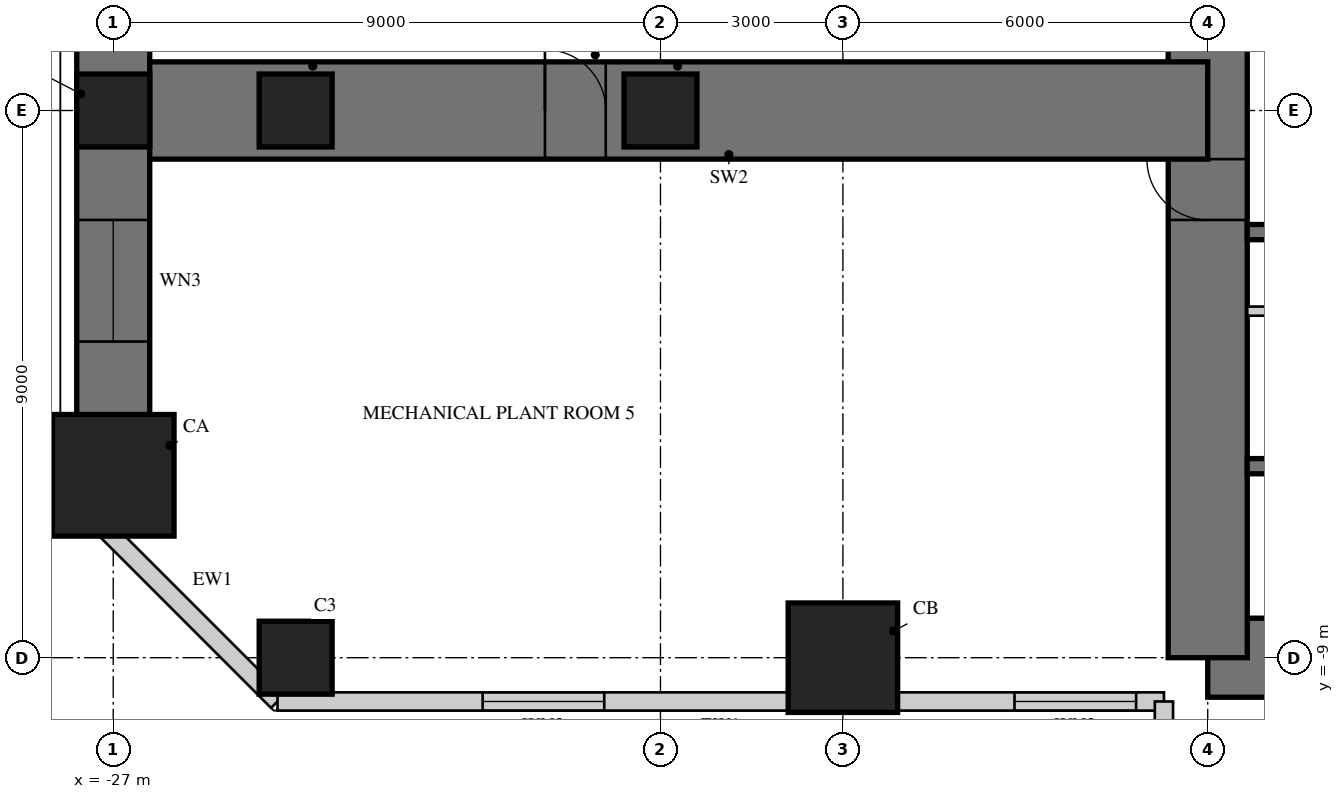
"""IFC4 building model, lengths in metres.
Left out: names, types, materials, properties, quantities, classifications, styles, units other than length and angle.
Written with IfcOpenShell. Run it as: python <this file> out.ifc"""

import sys

from ifc_helpers import new_model, si_unit, direction, frame, frame_2d, origin, origin_2d, place, context, subcontext, project, spatial, rectangle, hollow_rectangle, extrude, element, fill, save


model = new_model("IFC4")
c1 = context("Model", 3, precision=1e-05, world=origin(), true_north=direction((0.0, 1.0)))
c2 = subcontext(c1, "Body", "Model", "MODEL_VIEW")
j1 = project(units=[si_unit("LENGTHUNIT", "METRE"), si_unit("PLANEANGLEUNIT", "RADIAN")], contexts=[c1])
p1 = place(None, origin())
s1 = spatial("IfcSite", under=j1, at=p1, CompositionType="ELEMENT")
p2 = place(p1, origin())
s2 = spatial("IfcBuilding", under=s1, at=p2, CompositionType="ELEMENT")
p3 = place(p2, frame((0.0, 0.0, 18.5)))
s3 = spatial("IfcBuildingStorey", under=s2, at=p3, CompositionType="ELEMENT", Elevation=18.5)
p4 = place(p3, frame((-9.0, -9.0, 0.0), z_axis=(0.0, 0.0, 1.0), x_axis=(1.0, 0.0, 0.0)))
e1 = element("IfcWall", 1, at=p4, inside=s3, PredefinedType="SHEAR", context=c2, shape_type="SweptSolid", body=[
    extrude(rectangle(XDim=18.0, YDim=1.3, at=frame_2d((9.0, 0.0))), origin(), (0.0, 0.0, 1.0), 5.0),
])
p5 = place(p4, frame((9.8, 0.0, 0.0)))
e2 = element("IfcOpeningElement", 2, at=p5, cuts=e1, PredefinedType="OPENING", context=c2, shape_type="SweptSolid", body=[
    extrude(rectangle(XDim=1.0, YDim=2.4, at=frame_2d((0.5, 1.2))), frame((0.0, 0.66, 0.0), z_axis=(0.0, -1.0, 0.0), x_axis=(1.0, 0.0, 0.0)), (0.0, 0.0, 1.0), 1.32),
])
p6 = place(p3, frame((-9.0, 9.0, 0.0), z_axis=(0.0, 0.0, 1.0), x_axis=(0.0, -1.0, 0.0)))
e3 = element("IfcWall", 3, at=p6, inside=s3, PredefinedType="SHEAR", context=c2, shape_type="SweptSolid", body=[
    extrude(rectangle(XDim=18.0, YDim=1.3, at=frame_2d((9.0, 0.0))), origin(), (0.0, 0.0, 1.0), 5.0),
])
p7 = place(p6, frame((9.8, 0.0, 0.0)))
e4 = element("IfcOpeningElement", 4, at=p7, cuts=e3, PredefinedType="OPENING", context=c2, shape_type="SweptSolid", body=[
    extrude(rectangle(XDim=1.0, YDim=2.4, at=frame_2d((0.5, 1.2))), frame((0.0, 0.66, 0.0), z_axis=(0.0, -1.0, 0.0), x_axis=(1.0, 0.0, 0.0)), (0.0, 0.0, 1.0), 1.32),
])
for number, where, z_axis, x_axis in (
    (5, (-1.925, -2.0, 0.0), (0.0, 0.0, 1.0), (-1.0, 0.0, 0.0)),
    (6, (-1.925, -5.85, 0.0), (0.0, 0.0, 1.0), (-1.0, 0.0, 0.0)),
):
    element("IfcWall", number, at=place(p3, frame(where, z_axis=z_axis, x_axis=x_axis)), inside=s3, PredefinedType="SHEAR", context=c2, shape_type="SweptSolid", body=[
        extrude(rectangle(XDim=6.425, YDim=0.25, at=frame_2d((3.212, 0.0))), origin(), (0.0, 0.0, 1.0), 5.0),
    ])
p8 = place(p3, frame((-1.925, -3.3, 0.0), z_axis=(0.0, 0.0, 1.0), x_axis=(-1.0, 0.0, 0.0)))
e7 = element("IfcWall", 7, at=p8, inside=s3, PredefinedType="PARTITIONING", context=c2, shape_type="SweptSolid", body=[
    extrude(rectangle(XDim=6.425, YDim=0.15, at=frame_2d((3.212, 0.0))), origin(), (0.0, 0.0, 1.0), 5.0),
])
p9 = place(p8, frame((0.075, 0.0, 0.0)))
e8 = element("IfcOpeningElement", 8, at=p9, cuts=e7, PredefinedType="OPENING", context=c2, shape_type="SweptSolid", body=[
    extrude(rectangle(XDim=0.8, YDim=2.1, at=frame_2d((0.4, 1.05))), frame((0.0, 0.085, 0.0), z_axis=(0.0, -1.0, 0.0), x_axis=(1.0, 0.0, 0.0)), (0.0, 0.0, 1.0), 0.17),
])
p10 = place(p8, frame((3.675, 0.0, 0.0)))
e9 = element("IfcOpeningElement", 9, at=p10, cuts=e7, PredefinedType="OPENING", context=c2, shape_type="SweptSolid", body=[
    extrude(rectangle(XDim=0.8, YDim=2.1, at=frame_2d((0.4, 1.05))), frame((0.0, 0.085, 0.0), z_axis=(0.0, -1.0, 0.0), x_axis=(1.0, 0.0, 0.0)), (0.0, 0.0, 1.0), 0.17),
])
p11 = place(p3, frame((-9.0, 0.0, 0.0), z_axis=(0.0, 0.0, 1.0), x_axis=(-1.0, 0.0, 0.0)))
e10 = element("IfcWall", 10, at=p11, inside=s3, PredefinedType="SHEAR", context=c2, shape_type="SweptSolid", body=[
    extrude(rectangle(XDim=18.0, YDim=1.6, at=frame_2d((9.0, 0.0))), origin(), (0.0, 0.0, 1.0), 5.0),
])
p12 = place(p11, frame((9.9, 0.0, 0.0)))
e11 = element("IfcOpeningElement", 11, at=p12, cuts=e10, PredefinedType="OPENING", context=c2, shape_type="SweptSolid", body=[
    extrude(rectangle(XDim=1.0, YDim=2.2, at=frame_2d((0.5, 1.1))), frame((0.0, 0.81, 0.0), z_axis=(0.0, -1.0, 0.0), x_axis=(1.0, 0.0, 0.0)), (0.0, 0.0, 1.0), 1.62),
])
p13 = place(p3, frame((-27.0, 6.0, 0.0), z_axis=(0.0, 0.0, 1.0), x_axis=(0.0, -1.0, 0.0)))
e12 = element("IfcWall", 12, at=p13, inside=s3, PredefinedType="SHEAR", context=c2, shape_type="SweptSolid", body=[
    extrude(rectangle(XDim=12.0, YDim=1.2, at=frame_2d((6.0, 0.0))), origin(), (0.0, 0.0, 1.0), 5.0),
])
p14 = place(p13, frame((2.2, 0.0, 0.8)))
e13 = element("IfcOpeningElement", 13, at=p14, cuts=e12, PredefinedType="OPENING", context=c2, shape_type="SweptSolid", body=[
    extrude(rectangle(XDim=2.0, YDim=2.5, at=frame_2d((1.0, 1.25))), frame((0.0, 0.61, 0.0), z_axis=(0.0, -1.0, 0.0), x_axis=(1.0, 0.0, 0.0)), (0.0, 0.0, 1.0), 1.22),
])
p15 = place(p13, frame((7.8, 0.0, 0.8)))
e14 = element("IfcOpeningElement", 14, at=p15, cuts=e12, PredefinedType="OPENING", context=c2, shape_type="SweptSolid", body=[
    extrude(rectangle(XDim=2.0, YDim=2.5, at=frame_2d((1.0, 1.25))), frame((0.0, 0.61, 0.0), z_axis=(0.0, -1.0, 0.0), x_axis=(1.0, 0.0, 0.0)), (0.0, 0.0, 1.0), 1.22),
])
p16 = place(p3, frame((-15.0, -9.0, 0.0), z_axis=(0.0, 0.0, 1.0), x_axis=(1.0, 0.0, 0.0)))
e15 = element("IfcColumn", 15, at=p16, inside=s3, PredefinedType="COLUMN", context=c2, shape_type="SweptSolid", body=[
    extrude(rectangle(XDim=1.8, YDim=1.8, at=origin_2d()), origin(), (0.0, 0.0, 1.0), 5.0),
])
for number, where, z_axis, x_axis in (
    (16, (-24.0, -9.0, 0.0), (0.0, 0.0, 1.0), (1.0, 0.0, 0.0)),
    (17, (-27.0, 0.0, 0.0), (0.0, 0.0, 1.0), (1.0, 0.0, 0.0)),
):
    element("IfcColumn", number, at=place(p3, frame(where, z_axis=z_axis, x_axis=x_axis)), inside=s3, PredefinedType="COLUMN", context=c2, shape_type="SweptSolid", body=[
        extrude(rectangle(XDim=1.2, YDim=1.2, at=origin_2d()), origin(), (0.0, 0.0, 1.0), 5.0),
    ])
p17 = place(p3, frame((-27.0, -6.0, 0.0), z_axis=(0.0, 0.0, 1.0), x_axis=(1.0, 0.0, 0.0)))
e18 = element("IfcColumn", 18, at=p17, inside=s3, PredefinedType="COLUMN", context=c2, shape_type="SweptSolid", body=[
    extrude(rectangle(XDim=2.0, YDim=2.0, at=origin_2d()), origin(), (0.0, 0.0, 1.0), 5.0),
])
for number, where, z_axis, x_axis in (
    (19, (-18.0, 0.0, 0.0), (0.0, 0.0, 1.0), (1.0, 0.0, 0.0)),
    (20, (-24.0, 0.0, 0.0), (0.0, 0.0, 1.0), (1.0, 0.0, 0.0)),
):
    element("IfcColumn", number, at=place(p3, frame(where, z_axis=z_axis, x_axis=x_axis)), inside=s3, PredefinedType="COLUMN", context=c2, shape_type="SweptSolid", body=[
        extrude(rectangle(XDim=1.2, YDim=1.2, at=origin_2d()), origin(), (0.0, 0.0, 1.0), 5.0),
    ])
p18 = place(p3, frame((-27.6, -6.418, 0.0), z_axis=(0.0, 0.0, 1.0), x_axis=(0.707106781187, -0.707106781187, 0.0)))
e21 = element("IfcWall", 21, at=p18, inside=s3, PredefinedType="SOLIDWALL", context=c2, shape_type="SweptSolid", body=[
    extrude(rectangle(XDim=4.669, YDim=0.3, at=frame_2d((2.335, 0.0))), origin(), (0.0, 0.0, 1.0), 4.8),
])
p19 = place(p3, frame((-24.298, -9.72, 0.0), z_axis=(0.0, 0.0, 1.0), x_axis=(1.0, 0.0, 0.0)))
e22 = element("IfcWall", 22, at=p19, inside=s3, PredefinedType="SOLIDWALL", context=c2, shape_type="SweptSolid", body=[
    extrude(rectangle(XDim=14.578, YDim=0.3, at=frame_2d((7.289, 0.0))), origin(), (0.0, 0.0, 1.0), 4.8),
])
p20 = place(p19, frame((3.374, 0.0, 0.8)))
e23 = element("IfcOpeningElement", 23, at=p20, cuts=e22, PredefinedType="OPENING", context=c2, shape_type="SweptSolid", body=[
    extrude(rectangle(XDim=2.0, YDim=2.5, at=frame_2d((1.0, 1.25))), frame((0.0, 0.16, 0.0), z_axis=(0.0, -1.0, 0.0), x_axis=(1.0, 0.0, 0.0)), (0.0, 0.0, 1.0), 0.32),
])
p21 = place(p19, frame((12.12, 0.0, 0.8)))
e24 = element("IfcOpeningElement", 24, at=p21, cuts=e22, PredefinedType="OPENING", context=c2, shape_type="SweptSolid", body=[
    extrude(rectangle(XDim=2.0, YDim=2.5, at=frame_2d((1.0, 1.25))), frame((0.0, 0.16, 0.0), z_axis=(0.0, -1.0, 0.0), x_axis=(1.0, 0.0, 0.0)), (0.0, 0.0, 1.0), 0.32),
])
p22 = place(p3, frame((-9.72, -9.72, 0.0), z_axis=(0.0, 0.0, 1.0), x_axis=(0.0, -1.0, 0.0)))
e25 = element("IfcWall", 25, at=p22, inside=s3, PredefinedType="SOLIDWALL", context=c2, shape_type="SweptSolid", body=[
    extrude(rectangle(XDim=14.578, YDim=0.3, at=frame_2d((7.289, 0.0))), origin(), (0.0, 0.0, 1.0), 4.8),
])
p23 = place(p22, frame((0.458, 0.0, 0.8)))
e26 = element("IfcOpeningElement", 26, at=p23, cuts=e25, PredefinedType="OPENING", context=c2, shape_type="SweptSolid", body=[
    extrude(rectangle(XDim=2.0, YDim=2.5, at=frame_2d((1.0, 1.25))), frame((0.0, 0.16, 0.0), z_axis=(0.0, -1.0, 0.0), x_axis=(1.0, 0.0, 0.0)), (0.0, 0.0, 1.0), 0.32),
])
p24 = place(p22, frame((9.205, 0.0, 0.8)))
e27 = element("IfcOpeningElement", 27, at=p24, cuts=e25, PredefinedType="OPENING", context=c2, shape_type="SweptSolid", body=[
    extrude(rectangle(XDim=2.0, YDim=2.5, at=frame_2d((1.0, 1.25))), frame((0.0, 0.16, 0.0), z_axis=(0.0, -1.0, 0.0), x_axis=(1.0, 0.0, 0.0)), (0.0, 0.0, 1.0), 0.32),
])
p25 = place(p15, origin())
e28 = element("IfcWindow", 28, at=p25, inside=s3, PartitioningType="SINGLE_PANEL", PredefinedType="WINDOW", context=c2, shape_type="SweptSolid", body=[
    extrude(hollow_rectangle(XDim=2.0, YDim=2.5, WallThickness=0.06, at=frame_2d((1.0, 1.25))), frame((0.0, 0.03, 0.0), z_axis=(0.0, -1.0, 0.0), x_axis=(1.0, 0.0, 0.0)), (0.0, 0.0, 1.0), 0.06),
    extrude(rectangle(XDim=1.879, YDim=2.379, at=frame_2d((1.0, 1.25))), frame((0.0, 0.03, 0.0), z_axis=(0.0, -1.0, 0.0), x_axis=(1.0, 0.0, 0.0)), (0.0, 0.0, 1.0), 0.06),
])
fill(e14, e28)
p26 = place(p20, origin())
e29 = element("IfcWindow", 29, at=p26, inside=s3, PartitioningType="SINGLE_PANEL", PredefinedType="WINDOW", context=c2, shape_type="SweptSolid", body=[
    extrude(hollow_rectangle(XDim=2.0, YDim=2.5, WallThickness=0.06, at=frame_2d((1.0, 1.25))), frame((0.0, 0.03, 0.0), z_axis=(0.0, -1.0, 0.0), x_axis=(1.0, 0.0, 0.0)), (0.0, 0.0, 1.0), 0.06),
    extrude(rectangle(XDim=1.879, YDim=2.379, at=frame_2d((1.0, 1.25))), frame((0.0, 0.03, 0.0), z_axis=(0.0, -1.0, 0.0), x_axis=(1.0, 0.0, 0.0)), (0.0, 0.0, 1.0), 0.06),
])
fill(e23, e29)
p27 = place(p21, origin())
e30 = element("IfcWindow", 30, at=p27, inside=s3, PartitioningType="SINGLE_PANEL", PredefinedType="WINDOW", context=c2, shape_type="SweptSolid", body=[
    extrude(hollow_rectangle(XDim=2.0, YDim=2.5, WallThickness=0.06, at=frame_2d((1.0, 1.25))), frame((0.0, 0.03, 0.0), z_axis=(0.0, -1.0, 0.0), x_axis=(1.0, 0.0, 0.0)), (0.0, 0.0, 1.0), 0.06),
    extrude(rectangle(XDim=1.879, YDim=2.379, at=frame_2d((1.0, 1.25))), frame((0.0, 0.03, 0.0), z_axis=(0.0, -1.0, 0.0), x_axis=(1.0, 0.0, 0.0)), (0.0, 0.0, 1.0), 0.06),
])
fill(e24, e30)
p28 = place(p12, frame((1.0, 0.0, 0.0), z_axis=(0.0, 0.0, 1.0), x_axis=(-1.0, 0.0, 0.0)))
e31 = element("IfcDoor", 31, at=p28, inside=s3, OperationType="SINGLE_SWING_LEFT", PredefinedType="DOOR", context=c2, shape_type="SweptSolid", body=[
    extrude(rectangle(XDim=1.0, YDim=2.2, at=frame_2d((0.5, 1.1))), frame((0.0, 0.025, 0.0), z_axis=(0.0, -1.0, 0.0), x_axis=(1.0, 0.0, 0.0)), (0.0, 0.0, 1.0), 0.05),
])
fill(e11, e31)
p29 = place(p7, frame((1.0, 0.0, 0.0), z_axis=(0.0, 0.0, 1.0), x_axis=(-1.0, 0.0, 0.0)))
e32 = element("IfcDoor", 32, at=p29, inside=s3, OperationType="SINGLE_SWING_RIGHT", PredefinedType="DOOR", context=c2, shape_type="SweptSolid", body=[
    extrude(rectangle(XDim=1.0, YDim=2.4, at=frame_2d((0.5, 1.2))), frame((0.0, -0.005, 0.0), z_axis=(0.0, -1.0, 0.0), x_axis=(1.0, 0.0, 0.0)), (0.0, 0.0, 1.0), 0.05),
])
fill(e4, e32)
save(model, sys.argv[1])
